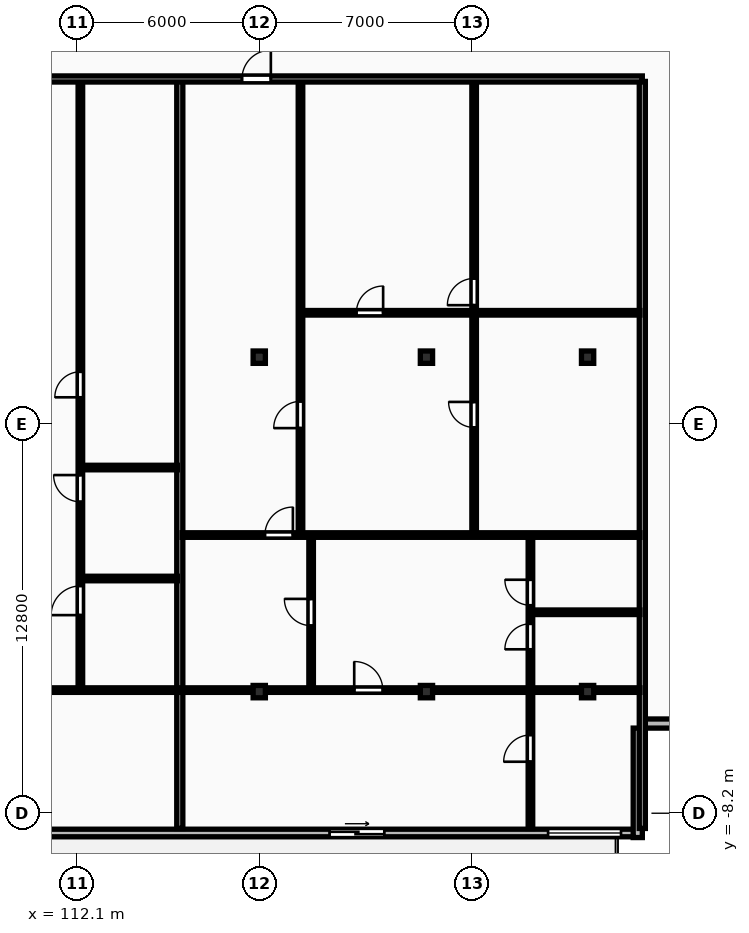
"""IFC4 building model, lengths in metres.
Left out: names, types, materials, properties, quantities, classifications, styles, units other than length and angle.
Written with IfcOpenShell. Run it as: python <this file> out.ifc"""

import sys

from ifc_helpers import new_model, si_unit, direction, frame, frame_2d, origin, origin_2d, place, context, subcontext, project, spatial, rectangle, i_section, extrude, element, fill, save


model = new_model("IFC4")
c1 = context("Model", 3, precision=1e-05, world=origin(), true_north=direction((0.0, 1.0)))
c2 = subcontext(c1, "Body", "Model", "MODEL_VIEW")
j1 = project(units=[si_unit("LENGTHUNIT", "METRE"), si_unit("PLANEANGLEUNIT", "RADIAN")], contexts=[c1])
p1 = place(None, origin())
s1 = spatial("IfcSite", under=j1, at=p1, CompositionType="ELEMENT")
p2 = place(p1, origin())
s2 = spatial("IfcBuilding", under=s1, at=p2, CompositionType="ELEMENT")
p3 = place(p2, frame((0.0, 0.0, 150.1)))
s3 = spatial("IfcBuildingStorey", under=s2, at=p3, CompositionType="ELEMENT", Elevation=150.1)
for number, where, z_axis, x_axis in (
    (1, (118.1, -4.2, 0.0), (0.0, 0.0, 1.0), (1.0, 0.0, 0.0)),
    (2, (118.1, 6.8, 0.0), (0.0, 0.0, 1.0), (1.0, 0.0, 0.0)),
    (3, (123.6, -4.2, 0.0), (0.0, 0.0, 1.0), (1.0, 0.0, 0.0)),
    (4, (123.6, 6.8, 0.0), (0.0, 0.0, 1.0), (1.0, 0.0, 0.0)),
    (5, (128.9, -4.2, 0.0), (0.0, 0.0, 1.0), (1.0, 0.0, 0.0)),
    (6, (128.9, 6.8, 0.0), (0.0, 0.0, 1.0), (1.0, 0.0, 0.0)),
):
    element("IfcColumn", number, at=place(p3, frame(where, z_axis=z_axis, x_axis=x_axis)), inside=s3, PredefinedType="COLUMN", context=c2, shape_type="SweptSolid", body=[
        extrude(i_section(OverallWidth=0.403, OverallDepth=0.406, WebThickness=0.027, FlangeThickness=0.043, FilletRadius=0.015, at=origin_2d()), origin(), (0.0, 0.0, 1.0), 3.6),
    ])
p4 = place(p3, frame((72.7, -8.85, 0.0), z_axis=(0.0, 0.0, 1.0), x_axis=(1.0, 0.0, 0.0)))
e7 = element("IfcWall", 7, at=p4, inside=s3, PredefinedType="STANDARD", context=c2, shape_type="SweptSolid", body=[
    extrude(rectangle(XDim=58.0, YDim=0.25, at=frame_2d((29.0, 0.0))), origin(), (0.0, 0.0, 1.0), 3.31),
])
p5 = place(p4, frame((3.761, 0.0, 0.0)))
e8 = element("IfcOpeningElement", 8, at=p5, cuts=e7, PredefinedType="OPENING", context=c2, shape_type="SweptSolid", body=[
    extrude(rectangle(XDim=1.8, YDim=2.2, at=frame_2d((0.9, 1.1))), frame((0.0, 0.135, 0.0), z_axis=(0.0, -1.0, 0.0), x_axis=(1.0, 0.0, 0.0)), (0.0, 0.0, 1.0), 0.27),
])
p6 = place(p4, frame((13.964, 0.0, 0.85)))
e9 = element("IfcOpeningElement", 9, at=p6, cuts=e7, PredefinedType="OPENING", context=c2, shape_type="SweptSolid", body=[
    extrude(rectangle(XDim=2.4, YDim=1.9, at=frame_2d((1.2, 0.95))), frame((0.0, 0.135, 0.0), z_axis=(0.0, -1.0, 0.0), x_axis=(1.0, 0.0, 0.0)), (0.0, 0.0, 1.0), 0.27),
])
p7 = place(p4, frame((25.138, 0.0, 0.0)))
e10 = element("IfcOpeningElement", 10, at=p7, cuts=e7, PredefinedType="OPENING", context=c2, shape_type="SweptSolid", body=[
    extrude(rectangle(XDim=1.8, YDim=2.2, at=frame_2d((0.9, 1.1))), frame((0.0, 0.135, 0.0), z_axis=(0.0, -1.0, 0.0), x_axis=(1.0, 0.0, 0.0)), (0.0, 0.0, 1.0), 0.27),
])
p8 = place(p4, frame((35.489, 0.0, 0.85)))
e11 = element("IfcOpeningElement", 11, at=p8, cuts=e7, PredefinedType="OPENING", context=c2, shape_type="SweptSolid", body=[
    extrude(rectangle(XDim=2.4, YDim=1.9, at=frame_2d((1.2, 0.95))), frame((0.0, 0.135, 0.0), z_axis=(0.0, -1.0, 0.0), x_axis=(1.0, 0.0, 0.0)), (0.0, 0.0, 1.0), 0.27),
])
p9 = place(p4, frame((47.713, 0.0, 0.0)))
e12 = element("IfcOpeningElement", 12, at=p9, cuts=e7, PredefinedType="OPENING", context=c2, shape_type="SweptSolid", body=[
    extrude(rectangle(XDim=1.8, YDim=2.2, at=frame_2d((0.9, 1.1))), frame((0.0, 0.135, 0.0), z_axis=(0.0, -1.0, 0.0), x_axis=(1.0, 0.0, 0.0)), (0.0, 0.0, 1.0), 0.27),
])
p10 = place(p4, frame((54.9, 0.0, 0.85)))
e13 = element("IfcOpeningElement", 13, at=p10, cuts=e7, PredefinedType="OPENING", context=c2, shape_type="SweptSolid", body=[
    extrude(rectangle(XDim=2.4, YDim=1.9, at=frame_2d((1.2, 0.95))), frame((0.0, 0.135, 0.0), z_axis=(0.0, -1.0, 0.0), x_axis=(1.0, 0.0, 0.0)), (0.0, 0.0, 1.0), 0.27),
])
for number, where, z_axis, x_axis in (
    (14, (130.55, -9.0, 0.0), (0.0, 0.0, 1.0), (0.0, 1.0, 0.0)),
    (15, (130.7, -5.25, 0.0), (0.0, 0.0, 1.0), (1.0, 0.0, 0.0)),
):
    element("IfcWall", number, at=place(p3, frame(where, z_axis=z_axis, x_axis=x_axis)), inside=s3, PredefinedType="STANDARD", context=c2, shape_type="SweptSolid", body=[
        extrude(rectangle(XDim=3.6, YDim=0.3, at=frame_2d((1.8, 0.0))), origin(), (0.0, 0.0, 1.0), 3.31),
    ])
for number, where, z_axis, x_axis in (
    (16, (130.7, -8.7, 0.0), (0.0, 0.0, 1.0), (0.0, 1.0, 0.0)),
    (17, (115.486, -8.7, 0.0), (0.0, 0.0, 1.0), (0.0, 1.0, 0.0)),
):
    element("IfcWall", number, at=place(p3, frame(where, z_axis=z_axis, x_axis=x_axis)), inside=s3, PredefinedType="PARTITIONING", context=c2, shape_type="SweptSolid", body=[
        extrude(rectangle(XDim=24.57, YDim=0.2, at=frame_2d((12.285, 0.0))), origin(), (0.0, 0.0, 1.0), 3.31),
    ])
for number, where, z_axis, x_axis in (
    (18, (112.276, -0.48, 0.0), (0.0, 0.0, 1.0), (1.0, 0.0, 0.0)),
    (19, (112.276, 3.17, 0.0), (0.0, 0.0, 1.0), (1.0, 0.0, 0.0)),
):
    element("IfcWall", number, at=place(p3, frame(where, z_axis=z_axis, x_axis=x_axis)), inside=s3, PredefinedType="PARTITIONING", context=c2, shape_type="SweptSolid", body=[
        extrude(rectangle(XDim=3.13, YDim=0.15, at=frame_2d((1.565, 0.0))), origin(), (0.0, 0.0, 1.0), 3.31),
    ])
p11 = place(p3, frame((112.216, -4.09, 0.0), z_axis=(0.0, 0.0, 1.0), x_axis=(0.0, 1.0, 0.0)))
e20 = element("IfcWall", 20, at=p11, inside=s3, PredefinedType="PARTITIONING", context=c2, shape_type="SweptSolid", body=[
    extrude(rectangle(XDim=19.98, YDim=0.15, at=frame_2d((9.99, 0.0))), origin(), (0.0, 0.0, 1.0), 3.31),
])
p12 = place(p11, frame((2.406, 0.0, 0.0)))
e21 = element("IfcOpeningElement", 21, at=p12, cuts=e20, PredefinedType="OPENING", context=c2, shape_type="SweptSolid", body=[
    extrude(rectangle(XDim=0.96, YDim=2.1, at=frame_2d((0.48, 1.05))), frame((0.0, 0.085, 0.0), z_axis=(0.0, -1.0, 0.0), x_axis=(1.0, 0.0, 0.0)), (0.0, 0.0, 1.0), 0.17),
])
p13 = place(p11, frame((6.133, 0.0, 0.0)))
e22 = element("IfcOpeningElement", 22, at=p13, cuts=e20, PredefinedType="OPENING", context=c2, shape_type="SweptSolid", body=[
    extrude(rectangle(XDim=0.88, YDim=2.06, at=frame_2d((0.44, 1.03))), frame((0.0, 0.085, 0.0), z_axis=(0.0, -1.0, 0.0), x_axis=(1.0, 0.0, 0.0)), (0.0, 0.0, 1.0), 0.17),
])
p14 = place(p11, frame((9.57, 0.0, 0.0)))
e23 = element("IfcOpeningElement", 23, at=p14, cuts=e20, PredefinedType="OPENING", context=c2, shape_type="SweptSolid", body=[
    extrude(rectangle(XDim=0.84, YDim=2.04, at=frame_2d((0.42, 1.02))), frame((0.0, 0.085, 0.0), z_axis=(0.0, -1.0, 0.0), x_axis=(1.0, 0.0, 0.0)), (0.0, 0.0, 1.0), 0.17),
])
p15 = place(p3, frame((94.025, -4.15, 0.0), z_axis=(0.0, 0.0, 1.0), x_axis=(1.0, 0.0, 0.0)))
e24 = element("IfcWall", 24, at=p15, inside=s3, PredefinedType="PARTITIONING", context=c2, shape_type="SweptSolid", body=[
    extrude(rectangle(XDim=21.381, YDim=0.15, at=frame_2d((10.69, 0.0))), origin(), (0.0, 0.0, 1.0), 3.003),
])
p16 = place(p15, frame((8.195, 0.0, 0.0)))
e25 = element("IfcOpeningElement", 25, at=p16, cuts=e24, PredefinedType="OPENING", context=c2, shape_type="SweptSolid", body=[
    extrude(rectangle(XDim=0.94, YDim=2.1, at=frame_2d((0.47, 1.05))), frame((0.0, 0.085, 0.0), z_axis=(0.0, -1.0, 0.0), x_axis=(1.0, 0.0, 0.0)), (0.0, 0.0, 1.0), 0.17),
])
p17 = place(p15, frame((10.22, 0.0, 0.0)))
e26 = element("IfcOpeningElement", 26, at=p17, cuts=e24, PredefinedType="OPENING", context=c2, shape_type="SweptSolid", body=[
    extrude(rectangle(XDim=0.94, YDim=2.1, at=frame_2d((0.47, 1.05))), frame((0.0, 0.085, 0.0), z_axis=(0.0, -1.0, 0.0), x_axis=(1.0, 0.0, 0.0)), (0.0, 0.0, 1.0), 0.17),
])
p18 = place(p3, frame((125.168, 0.99, 0.0), z_axis=(0.0, 0.0, 1.0), x_axis=(0.0, 1.0, 0.0)))
e27 = element("IfcWall", 27, at=p18, inside=s3, PredefinedType="PARTITIONING", context=c2, shape_type="SweptSolid", body=[
    extrude(rectangle(XDim=14.9, YDim=0.15, at=frame_2d((7.45, 0.0))), origin(), (0.0, 0.0, 1.0), 3.31),
])
p19 = place(p18, frame((3.498, 0.0, 0.0)))
e28 = element("IfcOpeningElement", 28, at=p19, cuts=e27, PredefinedType="OPENING", context=c2, shape_type="SweptSolid", body=[
    extrude(rectangle(XDim=0.84, YDim=2.04, at=frame_2d((0.42, 1.02))), frame((0.0, 0.085, 0.0), z_axis=(0.0, -1.0, 0.0), x_axis=(1.0, 0.0, 0.0)), (0.0, 0.0, 1.0), 0.17),
])
p20 = place(p18, frame((7.52, 0.0, 0.0)))
e29 = element("IfcOpeningElement", 29, at=p20, cuts=e27, PredefinedType="OPENING", context=c2, shape_type="SweptSolid", body=[
    extrude(rectangle(XDim=0.88, YDim=2.06, at=frame_2d((0.44, 1.03))), frame((0.0, 0.085, 0.0), z_axis=(0.0, -1.0, 0.0), x_axis=(1.0, 0.0, 0.0)), (0.0, 0.0, 1.0), 0.17),
])
p21 = place(p3, frame((119.516, 8.26, 0.0), z_axis=(0.0, 0.0, 1.0), x_axis=(1.0, 0.0, 0.0)))
e30 = element("IfcWall", 30, at=p21, inside=s3, PredefinedType="PARTITIONING", context=c2, shape_type="SweptSolid", body=[
    extrude(rectangle(XDim=11.104, YDim=0.15, at=frame_2d((5.552, 0.0))), origin(), (0.0, 0.0, 1.0), 3.31),
])
p22 = place(p21, frame((1.779, 0.0, 0.0)))
e31 = element("IfcOpeningElement", 31, at=p22, cuts=e30, PredefinedType="OPENING", context=c2, shape_type="SweptSolid", body=[
    extrude(rectangle(XDim=0.88, YDim=2.06, at=frame_2d((0.44, 1.03))), frame((0.0, 0.085, 0.0), z_axis=(0.0, -1.0, 0.0), x_axis=(1.0, 0.0, 0.0)), (0.0, 0.0, 1.0), 0.17),
])
p23 = place(p3, frame((119.456, 0.99, 0.0), z_axis=(0.0, 0.0, 1.0), x_axis=(0.0, 1.0, 0.0)))
e32 = element("IfcWall", 32, at=p23, inside=s3, PredefinedType="PARTITIONING", context=c2, shape_type="SweptSolid", body=[
    extrude(rectangle(XDim=14.9, YDim=0.15, at=frame_2d((7.45, 0.0))), origin(), (0.0, 0.0, 1.0), 3.31),
])
p24 = place(p23, frame((3.477, 0.0, 0.0)))
e33 = element("IfcOpeningElement", 33, at=p24, cuts=e32, PredefinedType="OPENING", context=c2, shape_type="SweptSolid", body=[
    extrude(rectangle(XDim=0.88, YDim=2.06, at=frame_2d((0.44, 1.03))), frame((0.0, 0.085, 0.0), z_axis=(0.0, -1.0, 0.0), x_axis=(1.0, 0.0, 0.0)), (0.0, 0.0, 1.0), 0.17),
])
p25 = place(p3, frame((119.806, -4.09, 0.0), z_axis=(0.0, 0.0, 1.0), x_axis=(0.0, 1.0, 0.0)))
e34 = element("IfcWall", 34, at=p25, inside=s3, PredefinedType="PARTITIONING", context=c2, shape_type="SweptSolid", body=[
    extrude(rectangle(XDim=5.0, YDim=0.15, at=frame_2d((2.5, 0.0))), origin(), (0.0, 0.0, 1.0), 3.31),
])
p26 = place(p25, frame((2.06, 0.0, 0.0)))
e35 = element("IfcOpeningElement", 35, at=p26, cuts=e34, PredefinedType="OPENING", context=c2, shape_type="SweptSolid", body=[
    extrude(rectangle(XDim=0.88, YDim=2.06, at=frame_2d((0.44, 1.03))), frame((0.0, 0.085, 0.0), z_axis=(0.0, -1.0, 0.0), x_axis=(1.0, 0.0, 0.0)), (0.0, 0.0, 1.0), 0.17),
])
p27 = place(p3, frame((127.08, -1.59, 0.0), z_axis=(0.0, 0.0, 1.0), x_axis=(1.0, 0.0, 0.0)))
e36 = element("IfcWall", 36, at=p27, inside=s3, PredefinedType="PARTITIONING", context=c2, shape_type="SweptSolid", body=[
    extrude(rectangle(XDim=3.54, YDim=0.15, at=frame_2d((1.77, 0.0))), origin(), (0.0, 0.0, 1.0), 3.31),
])
p28 = place(p3, frame((127.02, -8.7, 0.0), z_axis=(0.0, 0.0, 1.0), x_axis=(0.0, 1.0, 0.0)))
e37 = element("IfcWall", 37, at=p28, inside=s3, PredefinedType="PARTITIONING", context=c2, shape_type="SweptSolid", body=[
    extrude(rectangle(XDim=9.61, YDim=0.15, at=frame_2d((4.805, 0.0))), origin(), (0.0, 0.0, 1.0), 3.31),
])
p29 = place(p28, frame((5.892, 0.0, 0.0)))
e38 = element("IfcOpeningElement", 38, at=p29, cuts=e37, PredefinedType="OPENING", context=c2, shape_type="SweptSolid", body=[
    extrude(rectangle(XDim=0.84, YDim=2.04, at=frame_2d((0.42, 1.02))), frame((0.0, 0.085, 0.0), z_axis=(0.0, -1.0, 0.0), x_axis=(1.0, 0.0, 0.0)), (0.0, 0.0, 1.0), 0.17),
])
p30 = place(p28, frame((7.34, 0.0, 0.0)))
e39 = element("IfcOpeningElement", 39, at=p30, cuts=e37, PredefinedType="OPENING", context=c2, shape_type="SweptSolid", body=[
    extrude(rectangle(XDim=0.84, YDim=2.04, at=frame_2d((0.42, 1.02))), frame((0.0, 0.085, 0.0), z_axis=(0.0, -1.0, 0.0), x_axis=(1.0, 0.0, 0.0)), (0.0, 0.0, 1.0), 0.17),
])
p31 = place(p28, frame((2.194, 0.0, 0.0)))
e40 = element("IfcOpeningElement", 40, at=p31, cuts=e37, PredefinedType="OPENING", context=c2, shape_type="SweptSolid", body=[
    extrude(rectangle(XDim=0.88, YDim=2.06, at=frame_2d((0.44, 1.03))), frame((0.0, 0.085, 0.0), z_axis=(0.0, -1.0, 0.0), x_axis=(1.0, 0.0, 0.0)), (0.0, 0.0, 1.0), 0.17),
])
p32 = place(p3, frame((115.566, 0.95, 0.0), z_axis=(0.0, 0.0, 1.0), x_axis=(1.0, 0.0, 0.0)))
e41 = element("IfcWall", 41, at=p32, inside=s3, PredefinedType="PARTITIONING", context=c2, shape_type="SweptSolid", body=[
    extrude(rectangle(XDim=15.054, YDim=0.15, at=frame_2d((7.527, 0.0))), origin(), (0.0, 0.0, 1.0), 3.31),
])
p33 = place(p32, frame((2.72, 0.0, 0.0)))
e42 = element("IfcOpeningElement", 42, at=p33, cuts=e41, PredefinedType="OPENING", context=c2, shape_type="SweptSolid", body=[
    extrude(rectangle(XDim=0.92, YDim=2.08, at=frame_2d((0.46, 1.04))), frame((0.0, 0.085, 0.0), z_axis=(0.0, -1.0, 0.0), x_axis=(1.0, 0.0, 0.0)), (0.0, 0.0, 1.0), 0.17),
])
p34 = place(p3, frame((115.566, -4.15, 0.0), z_axis=(0.0, 0.0, 1.0), x_axis=(1.0, 0.0, 0.0)))
e43 = element("IfcWall", 43, at=p34, inside=s3, PredefinedType="PARTITIONING", context=c2, shape_type="SweptSolid", body=[
    extrude(rectangle(XDim=15.054, YDim=0.15, at=frame_2d((7.527, 0.0))), origin(), (0.0, 0.0, 1.0), 3.003),
])
p35 = place(p34, frame((5.657, 0.0, 0.0)))
e44 = element("IfcOpeningElement", 44, at=p35, cuts=e43, PredefinedType="OPENING", context=c2, shape_type="SweptSolid", body=[
    extrude(rectangle(XDim=0.94, YDim=2.1, at=frame_2d((0.47, 1.05))), frame((0.0, 0.085, 0.0), z_axis=(0.0, -1.0, 0.0), x_axis=(1.0, 0.0, 0.0)), (0.0, 0.0, 1.0), 0.17),
])
p36 = place(p3, frame((72.7, 15.95, 0.0), z_axis=(0.0, 0.0, 1.0), x_axis=(1.0, 0.0, 0.0)))
e45 = element("IfcWall", 45, at=p36, inside=s3, PredefinedType="PARTITIONING", context=c2, shape_type="SweptSolid", body=[
    extrude(rectangle(XDim=58.0, YDim=0.2, at=frame_2d((29.0, 0.0))), origin(), (0.0, 0.0, 1.0), 3.31),
])
p37 = place(p36, frame((10.868, 0.0, 0.0)))
e46 = element("IfcOpeningElement", 46, at=p37, cuts=e45, PredefinedType="OPENING", context=c2, shape_type="SweptSolid", body=[
    extrude(rectangle(XDim=1.22, YDim=2.18, at=frame_2d((0.61, 1.09))), frame((0.0, 0.11, 0.0), z_axis=(0.0, -1.0, 0.0), x_axis=(1.0, 0.0, 0.0)), (0.0, 0.0, 1.0), 0.22),
])
p38 = place(p36, frame((30.441, 0.0, 0.0)))
e47 = element("IfcOpeningElement", 47, at=p38, cuts=e45, PredefinedType="OPENING", context=c2, shape_type="SweptSolid", body=[
    extrude(rectangle(XDim=1.22, YDim=2.18, at=frame_2d((0.61, 1.09))), frame((0.0, 0.11, 0.0), z_axis=(0.0, -1.0, 0.0), x_axis=(1.0, 0.0, 0.0)), (0.0, 0.0, 1.0), 0.22),
])
p39 = place(p36, frame((44.831, 0.0, 0.0)))
e48 = element("IfcOpeningElement", 48, at=p39, cuts=e45, PredefinedType="OPENING", context=c2, shape_type="SweptSolid", body=[
    extrude(rectangle(XDim=0.95, YDim=2.15, at=frame_2d((0.475, 1.075))), frame((0.0, 0.11, 0.0), z_axis=(0.0, -1.0, 0.0), x_axis=(1.0, 0.0, 0.0)), (0.0, 0.0, 1.0), 0.22),
])
p40 = place(p9, origin())
e49 = element("IfcDoor", 49, at=p40, inside=s3, OperationType="SLIDING_TO_RIGHT", PredefinedType="DOOR", context=c2, shape_type="SweptSolid", body=[
    extrude(rectangle(XDim=1.8, YDim=2.2, at=frame_2d((0.9, 1.1))), frame((0.0, 0.025, 0.0), z_axis=(0.0, -1.0, 0.0), x_axis=(1.0, 0.0, 0.0)), (0.0, 0.0, 1.0), 0.05),
])
fill(e12, e49)
p41 = place(p10, origin())
e50 = element("IfcWindow", 50, at=p41, inside=s3, PartitioningType="DOUBLE_PANEL_VERTICAL", PredefinedType="WINDOW", context=c2, shape_type="SweptSolid", body=[
    extrude(rectangle(XDim=2.4, YDim=1.9, at=frame_2d((1.2, 0.95))), frame((0.0, 0.03, 0.0), z_axis=(0.0, -1.0, 0.0), x_axis=(1.0, 0.0, 0.0)), (0.0, 0.0, 1.0), 0.06),
])
fill(e13, e50)
p42 = place(p12, origin())
e51 = element("IfcDoor", 51, at=p42, inside=s3, OperationType="SINGLE_SWING_LEFT", PredefinedType="DOOR", context=c2, shape_type="SweptSolid", body=[
    extrude(rectangle(XDim=0.96, YDim=2.1, at=frame_2d((0.48, 1.05))), frame((0.0, 0.025, 0.0), z_axis=(0.0, -1.0, 0.0), x_axis=(1.0, 0.0, 0.0)), (0.0, 0.0, 1.0), 0.05),
])
fill(e21, e51)
p43 = place(p13, origin())
e52 = element("IfcDoor", 52, at=p43, inside=s3, OperationType="SINGLE_SWING_RIGHT", PredefinedType="DOOR", context=c2, shape_type="SweptSolid", body=[
    extrude(rectangle(XDim=0.88, YDim=2.06, at=frame_2d((0.44, 1.03))), frame((0.0, 0.025, 0.0), z_axis=(0.0, -1.0, 0.0), x_axis=(1.0, 0.0, 0.0)), (0.0, 0.0, 1.0), 0.05),
])
fill(e22, e52)
p44 = place(p14, origin())
e53 = element("IfcDoor", 53, at=p44, inside=s3, OperationType="SINGLE_SWING_LEFT", PredefinedType="DOOR", context=c2, shape_type="SweptSolid", body=[
    extrude(rectangle(XDim=0.84, YDim=2.04, at=frame_2d((0.42, 1.02))), frame((0.0, 0.025, 0.0), z_axis=(0.0, -1.0, 0.0), x_axis=(1.0, 0.0, 0.0)), (0.0, 0.0, 1.0), 0.05),
])
fill(e23, e53)
p45 = place(p19, origin())
e54 = element("IfcDoor", 54, at=p45, inside=s3, OperationType="SINGLE_SWING_RIGHT", PredefinedType="DOOR", context=c2, shape_type="SweptSolid", body=[
    extrude(rectangle(XDim=0.84, YDim=2.04, at=frame_2d((0.42, 1.02))), frame((0.0, 0.025, 0.0), z_axis=(0.0, -1.0, 0.0), x_axis=(1.0, 0.0, 0.0)), (0.0, 0.0, 1.0), 0.05),
])
fill(e28, e54)
p46 = place(p20, origin())
e55 = element("IfcDoor", 55, at=p46, inside=s3, OperationType="SINGLE_SWING_LEFT", PredefinedType="DOOR", context=c2, shape_type="SweptSolid", body=[
    extrude(rectangle(XDim=0.88, YDim=2.06, at=frame_2d((0.44, 1.03))), frame((0.0, 0.025, 0.0), z_axis=(0.0, -1.0, 0.0), x_axis=(1.0, 0.0, 0.0)), (0.0, 0.0, 1.0), 0.05),
])
fill(e29, e55)
p47 = place(p22, origin())
e56 = element("IfcDoor", 56, at=p47, inside=s3, OperationType="SINGLE_SWING_RIGHT", PredefinedType="DOOR", context=c2, shape_type="SweptSolid", body=[
    extrude(rectangle(XDim=0.88, YDim=2.06, at=frame_2d((0.44, 1.03))), frame((0.0, 0.025, 0.0), z_axis=(0.0, -1.0, 0.0), x_axis=(1.0, 0.0, 0.0)), (0.0, 0.0, 1.0), 0.05),
])
fill(e31, e56)
p48 = place(p24, origin())
e57 = element("IfcDoor", 57, at=p48, inside=s3, OperationType="SINGLE_SWING_LEFT", PredefinedType="DOOR", context=c2, shape_type="SweptSolid", body=[
    extrude(rectangle(XDim=0.88, YDim=2.06, at=frame_2d((0.44, 1.03))), frame((0.0, 0.025, 0.0), z_axis=(0.0, -1.0, 0.0), x_axis=(1.0, 0.0, 0.0)), (0.0, 0.0, 1.0), 0.05),
])
fill(e33, e57)
p49 = place(p26, origin())
e58 = element("IfcDoor", 58, at=p49, inside=s3, OperationType="SINGLE_SWING_RIGHT", PredefinedType="DOOR", context=c2, shape_type="SweptSolid", body=[
    extrude(rectangle(XDim=0.88, YDim=2.06, at=frame_2d((0.44, 1.03))), frame((0.0, 0.025, 0.0), z_axis=(0.0, -1.0, 0.0), x_axis=(1.0, 0.0, 0.0)), (0.0, 0.0, 1.0), 0.05),
])
fill(e35, e58)
p50 = place(p29, origin())
e59 = element("IfcDoor", 59, at=p50, inside=s3, OperationType="SINGLE_SWING_LEFT", PredefinedType="DOOR", context=c2, shape_type="SweptSolid", body=[
    extrude(rectangle(XDim=0.84, YDim=2.04, at=frame_2d((0.42, 1.02))), frame((0.0, 0.025, 0.0), z_axis=(0.0, -1.0, 0.0), x_axis=(1.0, 0.0, 0.0)), (0.0, 0.0, 1.0), 0.05),
])
fill(e38, e59)
p51 = place(p30, origin())
e60 = element("IfcDoor", 60, at=p51, inside=s3, OperationType="SINGLE_SWING_RIGHT", PredefinedType="DOOR", context=c2, shape_type="SweptSolid", body=[
    extrude(rectangle(XDim=0.84, YDim=2.04, at=frame_2d((0.42, 1.02))), frame((0.0, 0.025, 0.0), z_axis=(0.0, -1.0, 0.0), x_axis=(1.0, 0.0, 0.0)), (0.0, 0.0, 1.0), 0.05),
])
fill(e39, e60)
p52 = place(p31, origin())
e61 = element("IfcDoor", 61, at=p52, inside=s3, OperationType="SINGLE_SWING_LEFT", PredefinedType="DOOR", context=c2, shape_type="SweptSolid", body=[
    extrude(rectangle(XDim=0.88, YDim=2.06, at=frame_2d((0.44, 1.03))), frame((0.0, 0.025, 0.0), z_axis=(0.0, -1.0, 0.0), x_axis=(1.0, 0.0, 0.0)), (0.0, 0.0, 1.0), 0.05),
])
fill(e40, e61)
p53 = place(p33, origin())
e62 = element("IfcDoor", 62, at=p53, inside=s3, OperationType="SINGLE_SWING_RIGHT", PredefinedType="DOOR", context=c2, shape_type="SweptSolid", body=[
    extrude(rectangle(XDim=0.92, YDim=2.08, at=frame_2d((0.46, 1.04))), frame((0.0, 0.025, 0.0), z_axis=(0.0, -1.0, 0.0), x_axis=(1.0, 0.0, 0.0)), (0.0, 0.0, 1.0), 0.05),
])
fill(e42, e62)
p54 = place(p35, origin())
e63 = element("IfcDoor", 63, at=p54, inside=s3, OperationType="SINGLE_SWING_LEFT", PredefinedType="DOOR", context=c2, shape_type="SweptSolid", body=[
    extrude(rectangle(XDim=0.94, YDim=2.1, at=frame_2d((0.47, 1.05))), frame((0.0, 0.025, 0.0), z_axis=(0.0, -1.0, 0.0), x_axis=(1.0, 0.0, 0.0)), (0.0, 0.0, 1.0), 0.05),
])
fill(e44, e63)
p55 = place(p39, origin())
e64 = element("IfcDoor", 64, at=p55, inside=s3, OperationType="SINGLE_SWING_RIGHT", PredefinedType="DOOR", context=c2, shape_type="SweptSolid", body=[
    extrude(rectangle(XDim=0.95, YDim=2.15, at=frame_2d((0.475, 1.075))), frame((0.0, 0.025, 0.0), z_axis=(0.0, -1.0, 0.0), x_axis=(1.0, 0.0, 0.0)), (0.0, 0.0, 1.0), 0.05),
])
fill(e48, e64)
save(model, sys.argv[1])
